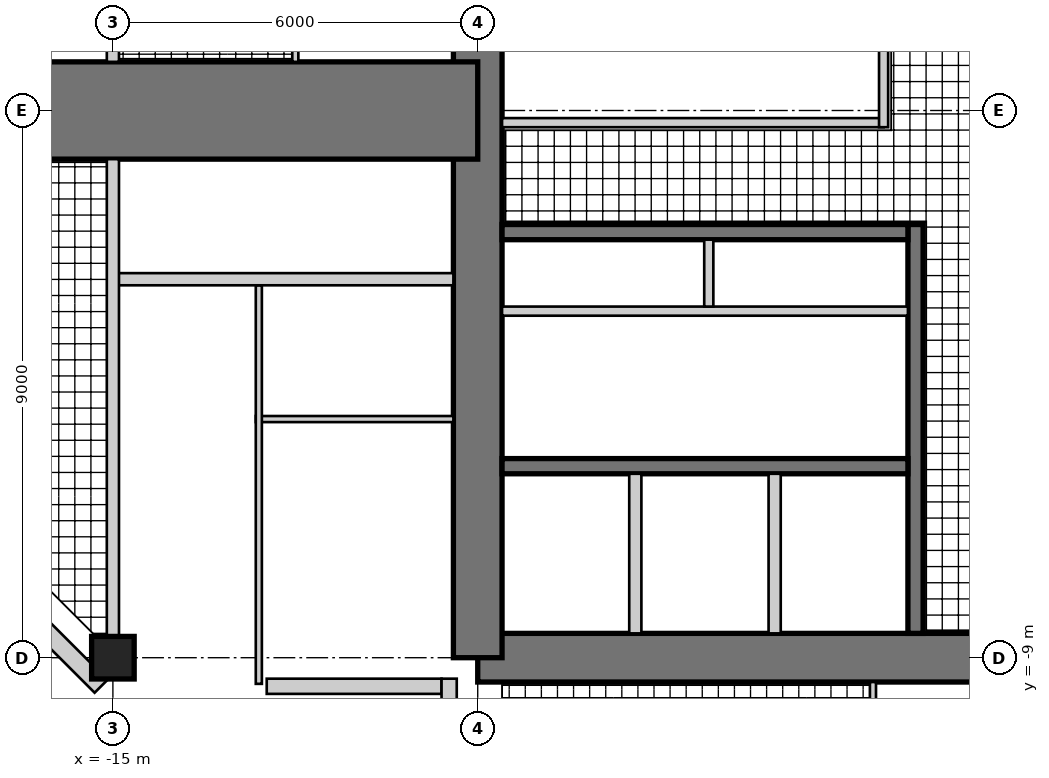
"""IFC4 building model, lengths in metres.
Left out: names, types, materials, properties, quantities, classifications, styles, units other than length and angle.
Written with IfcOpenShell. Run it as: python <this file> out.ifc"""

import sys

from ifc_helpers import new_model, si_unit, direction, frame, frame_2d, origin, origin_2d, place, context, subcontext, project, spatial, rectangle, hollow_rectangle, extrude, element, fill, save


model = new_model("IFC4")
c1 = context("Model", 3, precision=1e-05, world=origin(), true_north=direction((0.0, 1.0)))
c2 = subcontext(c1, "Body", "Model", "MODEL_VIEW")
j1 = project(units=[si_unit("LENGTHUNIT", "METRE"), si_unit("PLANEANGLEUNIT", "RADIAN")], contexts=[c1])
p1 = place(None, origin())
s1 = spatial("IfcSite", under=j1, at=p1, CompositionType="ELEMENT")
p2 = place(p1, origin())
s2 = spatial("IfcBuilding", under=s1, at=p2, CompositionType="ELEMENT")
p3 = place(p2, frame((0.0, 0.0, 261.1)))
s3 = spatial("IfcBuildingStorey", under=s2, at=p3, CompositionType="ELEMENT", Elevation=261.1)
p4 = place(p3, frame((-9.0, -9.0, 0.0), z_axis=(0.0, 0.0, 1.0), x_axis=(1.0, 0.0, 0.0)))
e1 = element("IfcWall", 1, at=p4, inside=s3, PredefinedType="SHEAR", context=c2, shape_type="SweptSolid", body=[
    extrude(rectangle(XDim=18.0, YDim=0.8, at=frame_2d((9.0, 0.0))), origin(), (0.0, 0.0, 1.0), 3.4),
])
p5 = place(p4, frame((9.8, 0.0, 0.0)))
e2 = element("IfcOpeningElement", 2, at=p5, cuts=e1, PredefinedType="OPENING", context=c2, shape_type="SweptSolid", body=[
    extrude(rectangle(XDim=1.0, YDim=2.4, at=frame_2d((0.5, 1.2))), frame((0.0, 0.41, 0.0), z_axis=(0.0, -1.0, 0.0), x_axis=(1.0, 0.0, 0.0)), (0.0, 0.0, 1.0), 0.82),
])
p6 = place(p3, frame((-9.0, 9.0, 0.0), z_axis=(0.0, 0.0, 1.0), x_axis=(0.0, -1.0, 0.0)))
e3 = element("IfcWall", 3, at=p6, inside=s3, PredefinedType="SHEAR", context=c2, shape_type="SweptSolid", body=[
    extrude(rectangle(XDim=18.0, YDim=0.8, at=frame_2d((9.0, 0.0))), origin(), (0.0, 0.0, 1.0), 3.4),
])
p7 = place(p6, frame((9.8, 0.0, 0.0)))
e4 = element("IfcOpeningElement", 4, at=p7, cuts=e3, PredefinedType="OPENING", context=c2, shape_type="SweptSolid", body=[
    extrude(rectangle(XDim=1.0, YDim=2.4, at=frame_2d((0.5, 1.2))), frame((0.0, 0.41, 0.0), z_axis=(0.0, -1.0, 0.0), x_axis=(1.0, 0.0, 0.0)), (0.0, 0.0, 1.0), 0.82),
])
p8 = place(p3, frame((-1.8, -1.875, 0.0), z_axis=(0.0, 0.0, 1.0), x_axis=(0.0, -1.0, 0.0)))
e5 = element("IfcWall", 5, at=p8, inside=s3, PredefinedType="SHEAR", context=c2, shape_type="SweptSolid", body=[
    extrude(rectangle(XDim=6.725, YDim=0.25, at=frame_2d((3.363, 0.0))), origin(), (0.0, 0.0, 1.0), 3.4),
])
p9 = place(p8, frame((1.875, 0.0, 0.0)))
e6 = element("IfcOpeningElement", 6, at=p9, cuts=e5, PredefinedType="OPENING", context=c2, shape_type="SweptSolid", body=[
    extrude(rectangle(XDim=1.6, YDim=2.4, at=frame_2d((0.8, 1.2))), frame((0.0, 0.135, 0.0), z_axis=(0.0, -1.0, 0.0), x_axis=(1.0, 0.0, 0.0)), (0.0, 0.0, 1.0), 0.27),
])
p10 = place(p3, frame((-1.925, -2.0, 0.0), z_axis=(0.0, 0.0, 1.0), x_axis=(-1.0, 0.0, 0.0)))
e7 = element("IfcWall", 7, at=p10, inside=s3, PredefinedType="SHEAR", context=c2, shape_type="SweptSolid", body=[
    extrude(rectangle(XDim=6.675, YDim=0.25, at=frame_2d((3.337, 0.0))), origin(), (0.0, 0.0, 1.0), 3.4),
])
p11 = place(p3, frame((-1.925, -5.85, 0.0), z_axis=(0.0, 0.0, 1.0), x_axis=(-1.0, 0.0, 0.0)))
e8 = element("IfcWall", 8, at=p11, inside=s3, PredefinedType="SHEAR", context=c2, shape_type="SweptSolid", body=[
    extrude(rectangle(XDim=6.675, YDim=0.25, at=frame_2d((3.337, 0.0))), origin(), (0.0, 0.0, 1.0), 3.4),
])
p12 = place(p11, frame((0.496, 0.0, 0.0)))
e9 = element("IfcOpeningElement", 9, at=p12, cuts=e8, PredefinedType="OPENING", context=c2, shape_type="SweptSolid", body=[
    extrude(rectangle(XDim=1.1, YDim=2.2, at=frame_2d((0.55, 1.1))), frame((0.0, 0.135, 0.0), z_axis=(0.0, -1.0, 0.0), x_axis=(1.0, 0.0, 0.0)), (0.0, 0.0, 1.0), 0.27),
])
p13 = place(p11, frame((2.788, 0.0, 0.0)))
e10 = element("IfcOpeningElement", 10, at=p13, cuts=e8, PredefinedType="OPENING", context=c2, shape_type="SweptSolid", body=[
    extrude(rectangle(XDim=1.1, YDim=2.2, at=frame_2d((0.55, 1.1))), frame((0.0, 0.135, 0.0), z_axis=(0.0, -1.0, 0.0), x_axis=(1.0, 0.0, 0.0)), (0.0, 0.0, 1.0), 0.27),
])
p14 = place(p11, frame((5.079, 0.0, 0.0)))
e11 = element("IfcOpeningElement", 11, at=p14, cuts=e8, PredefinedType="OPENING", context=c2, shape_type="SweptSolid", body=[
    extrude(rectangle(XDim=1.1, YDim=2.2, at=frame_2d((0.55, 1.1))), frame((0.0, 0.135, 0.0), z_axis=(0.0, -1.0, 0.0), x_axis=(1.0, 0.0, 0.0)), (0.0, 0.0, 1.0), 0.27),
])
p15 = place(p3, frame((-1.925, -3.3, 0.0), z_axis=(0.0, 0.0, 1.0), x_axis=(-1.0, 0.0, 0.0)))
e12 = element("IfcWall", 12, at=p15, inside=s3, PredefinedType="PARTITIONING", context=c2, shape_type="SweptSolid", body=[
    extrude(rectangle(XDim=6.675, YDim=0.15, at=frame_2d((3.337, 0.0))), origin(), (0.0, 0.0, 1.0), 3.4),
])
p16 = place(p15, frame((0.075, 0.0, 0.0)))
e13 = element("IfcOpeningElement", 13, at=p16, cuts=e12, PredefinedType="OPENING", context=c2, shape_type="SweptSolid", body=[
    extrude(rectangle(XDim=0.8, YDim=2.1, at=frame_2d((0.4, 1.05))), frame((0.0, 0.085, 0.0), z_axis=(0.0, -1.0, 0.0), x_axis=(1.0, 0.0, 0.0)), (0.0, 0.0, 1.0), 0.17),
])
p17 = place(p15, frame((3.675, 0.0, 0.0)))
e14 = element("IfcOpeningElement", 14, at=p17, cuts=e12, PredefinedType="OPENING", context=c2, shape_type="SweptSolid", body=[
    extrude(rectangle(XDim=0.8, YDim=2.1, at=frame_2d((0.4, 1.05))), frame((0.0, 0.085, 0.0), z_axis=(0.0, -1.0, 0.0), x_axis=(1.0, 0.0, 0.0)), (0.0, 0.0, 1.0), 0.17),
])
p18 = place(p3, frame((-5.2, -2.125, 0.0), z_axis=(0.0, 0.0, 1.0), x_axis=(0.0, -1.0, 0.0)))
e15 = element("IfcWall", 15, at=p18, inside=s3, PredefinedType="PARTITIONING", context=c2, shape_type="SweptSolid", body=[
    extrude(rectangle(XDim=1.1, YDim=0.15, at=frame_2d((0.55, 0.0))), origin(), (0.0, 0.0, 1.0), 3.4),
])
for number, where, z_axis, x_axis in (
    (16, (-4.117, -5.975, 0.0), (0.0, 0.0, 1.0), (0.0, -1.0, 0.0)),
    (17, (-6.408, -5.975, 0.0), (0.0, 0.0, 1.0), (0.0, -1.0, 0.0)),
):
    element("IfcWall", number, at=place(p3, frame(where, z_axis=z_axis, x_axis=x_axis)), inside=s3, PredefinedType="PARTITIONING", context=c2, shape_type="SweptSolid", body=[
        extrude(rectangle(XDim=2.625, YDim=0.2, at=frame_2d((1.312, 0.0))), origin(), (0.0, 0.0, 1.0), 3.4),
    ])
p19 = place(p3, frame((-9.0, 0.0, 0.0), z_axis=(0.0, 0.0, 1.0), x_axis=(-1.0, 0.0, 0.0)))
e18 = element("IfcWall", 18, at=p19, inside=s3, PredefinedType="SHEAR", context=c2, shape_type="SweptSolid", body=[
    extrude(rectangle(XDim=9.0, YDim=1.6, at=frame_2d((4.5, 0.0))), origin(), (0.0, 0.0, 1.0), 3.4),
])
p20 = place(p19, frame((3.8, 0.0, 0.0)))
e19 = element("IfcOpeningElement", 19, at=p20, cuts=e18, PredefinedType="OPENING", context=c2, shape_type="SweptSolid", body=[
    extrude(rectangle(XDim=1.0, YDim=2.15, at=frame_2d((0.5, 1.075))), frame((0.0, 0.81, 0.0), z_axis=(0.0, -1.0, 0.0), x_axis=(1.0, 0.0, 0.0)), (0.0, 0.0, 1.0), 1.62),
])
p21 = place(p19, frame((7.0, 0.0, 0.0)))
e20 = element("IfcOpeningElement", 20, at=p21, cuts=e18, PredefinedType="OPENING", context=c2, shape_type="SweptSolid", body=[
    extrude(rectangle(XDim=1.0, YDim=2.2, at=frame_2d((0.5, 1.1))), frame((0.0, 0.81, 0.0), z_axis=(0.0, -1.0, 0.0), x_axis=(1.0, 0.0, 0.0)), (0.0, 0.0, 1.0), 1.62),
])
p22 = place(p3, frame((-15.0, -9.0, 0.0), z_axis=(0.0, 0.0, 1.0), x_axis=(1.0, 0.0, 0.0)))
e21 = element("IfcColumn", 21, at=p22, inside=s3, PredefinedType="COLUMN", context=c2, shape_type="SweptSolid", body=[
    extrude(rectangle(XDim=0.7, YDim=0.7, at=origin_2d()), origin(), (0.0, 0.0, 1.0), 3.4),
])
p23 = place(p3, frame((-18.47, -6.195, 0.0), z_axis=(0.0, 0.0, 1.0), x_axis=(0.707106781187, -0.707106781187, 0.0)))
e22 = element("IfcWall", 22, at=p23, inside=s3, PredefinedType="SOLIDWALL", context=c2, shape_type="SweptSolid", body=[
    extrude(rectangle(XDim=4.632, YDim=0.3, at=frame_2d((2.316, 0.0))), origin(), (0.0, 0.0, 1.0), 3.22),
])
p24 = place(p23, frame((1.866, 0.0, 0.3)))
e23 = element("IfcOpeningElement", 23, at=p24, cuts=e22, PredefinedType="OPENING", context=c2, shape_type="SweptSolid", body=[
    extrude(rectangle(XDim=0.9, YDim=2.4, at=frame_2d((0.45, 1.2))), frame((0.0, 0.16, 0.0), z_axis=(0.0, -1.0, 0.0), x_axis=(1.0, 0.0, 0.0)), (0.0, 0.0, 1.0), 0.32),
])
p25 = place(p3, frame((-12.47, -9.47, 0.0), z_axis=(0.0, 0.0, 1.0), x_axis=(1.0, 0.0, 0.0)))
e24 = element("IfcWall", 24, at=p25, inside=s3, PredefinedType="SOLIDWALL", context=c2, shape_type="SweptSolid", body=[
    extrude(rectangle(XDim=2.875, YDim=0.25, at=frame_2d((1.438, 0.0))), origin(), (0.0, 0.0, 1.0), 3.22),
])
p26 = place(p25, frame((0.6, 0.0, 0.0)))
e25 = element("IfcOpeningElement", 25, at=p26, cuts=e24, PredefinedType="OPENING", context=c2, shape_type="SweptSolid", body=[
    extrude(rectangle(XDim=1.0, YDim=2.2, at=frame_2d((0.5, 1.1))), frame((0.0, 0.135, 0.0), z_axis=(0.0, -1.0, 0.0), x_axis=(1.0, 0.0, 0.0)), (0.0, 0.0, 1.0), 0.27),
])
p27 = place(p3, frame((-9.47, -9.345, 0.0), z_axis=(0.0, 0.0, 1.0), x_axis=(0.0, -1.0, 0.0)))
e26 = element("IfcWall", 26, at=p27, inside=s3, PredefinedType="SOLIDWALL", context=c2, shape_type="SweptSolid", body=[
    extrude(rectangle(XDim=3.125, YDim=0.25, at=frame_2d((1.562, 0.0))), origin(), (0.0, 0.0, 1.0), 3.22),
])
p28 = place(p27, frame((0.6, 0.0, 0.0)))
e27 = element("IfcOpeningElement", 27, at=p28, cuts=e26, PredefinedType="OPENING", context=c2, shape_type="SweptSolid", body=[
    extrude(rectangle(XDim=1.0, YDim=2.2, at=frame_2d((0.5, 1.1))), frame((0.0, 0.135, 0.0), z_axis=(0.0, -1.0, 0.0), x_axis=(1.0, 0.0, 0.0)), (0.0, 0.0, 1.0), 0.27),
])
p29 = place(p3, frame((-2.325, -0.2, 0.0), z_axis=(0.0, 0.0, 1.0), x_axis=(-1.0, 0.0, 0.0)))
e28 = element("IfcWall", 28, at=p29, inside=s3, PredefinedType="PARTITIONING", context=c2, shape_type="SweptSolid", body=[
    extrude(rectangle(XDim=6.275, YDim=0.15, at=frame_2d((3.138, 0.0))), origin(), (0.0, 0.0, 1.0), 3.22),
])
p30 = place(p29, frame((0.4, 0.0, 0.0)))
e29 = element("IfcOpeningElement", 29, at=p30, cuts=e28, PredefinedType="OPENING", context=c2, shape_type="SweptSolid", body=[
    extrude(rectangle(XDim=1.0, YDim=2.1, at=frame_2d((0.5, 1.05))), frame((0.0, 0.085, 0.0), z_axis=(0.0, -1.0, 0.0), x_axis=(1.0, 0.0, 0.0)), (0.0, 0.0, 1.0), 0.17),
])
p31 = place(p3, frame((-2.325, 1.675, 0.0), z_axis=(0.0, 0.0, 1.0), x_axis=(0.0, -1.0, 0.0)))
e30 = element("IfcWall", 30, at=p31, inside=s3, PredefinedType="PARTITIONING", context=c2, shape_type="SweptSolid", body=[
    extrude(rectangle(XDim=1.95, YDim=0.15, at=frame_2d((0.975, 0.0))), origin(), (0.0, 0.0, 1.0), 3.22),
])
p32 = place(p3, frame((-2.5, -9.4, 0.0), z_axis=(0.0, 0.0, 1.0), x_axis=(0.0, -1.0, 0.0)))
e31 = element("IfcWall", 31, at=p32, inside=s3, PredefinedType="PARTITIONING", context=c2, shape_type="SweptSolid", body=[
    extrude(rectangle(XDim=2.65, YDim=0.1, at=frame_2d((1.325, 0.0))), origin(), (0.0, 0.0, 1.0), 3.22),
])
p33 = place(p3, frame((-9.4, -5.075, 0.0), z_axis=(0.0, 0.0, 1.0), x_axis=(-1.0, 0.0, 0.0)))
e32 = element("IfcWall", 32, at=p33, inside=s3, PredefinedType="PARTITIONING", context=c2, shape_type="SweptSolid", body=[
    extrude(rectangle(XDim=3.25, YDim=0.1, at=frame_2d((1.625, 0.0))), origin(), (0.0, 0.0, 1.0), 3.22),
])
p34 = place(p3, frame((-12.6, -2.875, 0.0), z_axis=(0.0, 0.0, 1.0), x_axis=(0.0, -1.0, 0.0)))
e33 = element("IfcWall", 33, at=p34, inside=s3, PredefinedType="PARTITIONING", context=c2, shape_type="SweptSolid", body=[
    extrude(rectangle(XDim=6.555, YDim=0.1, at=frame_2d((3.277, 0.0))), origin(), (0.0, 0.0, 1.0), 3.22),
])
p35 = place(p34, frame((0.55, 0.0, 0.0)))
e34 = element("IfcOpeningElement", 34, at=p35, cuts=e33, PredefinedType="OPENING", context=c2, shape_type="SweptSolid", body=[
    extrude(rectangle(XDim=0.9, YDim=2.1, at=frame_2d((0.45, 1.05))), frame((0.0, 0.06, 0.0), z_axis=(0.0, -1.0, 0.0), x_axis=(1.0, 0.0, 0.0)), (0.0, 0.0, 1.0), 0.12),
])
p36 = place(p34, frame((2.65, 0.0, 0.0)))
e35 = element("IfcOpeningElement", 35, at=p36, cuts=e33, PredefinedType="OPENING", context=c2, shape_type="SweptSolid", body=[
    extrude(rectangle(XDim=0.9, YDim=2.1, at=frame_2d((0.45, 1.05))), frame((0.0, 0.06, 0.0), z_axis=(0.0, -1.0, 0.0), x_axis=(1.0, 0.0, 0.0)), (0.0, 0.0, 1.0), 0.12),
])
p37 = place(p3, frame((-12.0, 9.345, 0.0), z_axis=(0.0, 0.0, 1.0), x_axis=(0.0, -1.0, 0.0)))
e36 = element("IfcWall", 36, at=p37, inside=s3, PredefinedType="PARTITIONING", context=c2, shape_type="SweptSolid", body=[
    extrude(rectangle(XDim=8.545, YDim=0.1, at=frame_2d((4.272, 0.0))), origin(), (0.0, 0.0, 1.0), 3.22),
])
p38 = place(p37, frame((4.995, 0.0, 0.0)))
e37 = element("IfcOpeningElement", 37, at=p38, cuts=e36, PredefinedType="OPENING", context=c2, shape_type="SweptSolid", body=[
    extrude(rectangle(XDim=0.9, YDim=2.1, at=frame_2d((0.45, 1.05))), frame((0.0, 0.06, 0.0), z_axis=(0.0, -1.0, 0.0), x_axis=(1.0, 0.0, 0.0)), (0.0, 0.0, 1.0), 0.12),
])
p39 = place(p37, frame((7.095, 0.0, 0.0)))
e38 = element("IfcOpeningElement", 38, at=p39, cuts=e36, PredefinedType="OPENING", context=c2, shape_type="SweptSolid", body=[
    extrude(rectangle(XDim=0.9, YDim=2.1, at=frame_2d((0.45, 1.05))), frame((0.0, 0.06, 0.0), z_axis=(0.0, -1.0, 0.0), x_axis=(1.0, 0.0, 0.0)), (0.0, 0.0, 1.0), 0.12),
])
p40 = place(p3, frame((-9.4, -2.775, 0.0), z_axis=(0.0, 0.0, 1.0), x_axis=(-1.0, 0.0, 0.0)))
e39 = element("IfcWall", 39, at=p40, inside=s3, PredefinedType="SOLIDWALL", context=c2, shape_type="SweptSolid", body=[
    extrude(rectangle(XDim=5.6, YDim=0.2, at=frame_2d((2.8, 0.0))), origin(), (0.0, 0.0, 1.0), 3.22),
])
p41 = place(p40, frame((3.75, 0.0, 0.0)))
e40 = element("IfcOpeningElement", 40, at=p41, cuts=e39, PredefinedType="OPENING", context=c2, shape_type="SweptSolid", body=[
    extrude(rectangle(XDim=1.0, YDim=2.15, at=frame_2d((0.5, 1.075))), frame((0.0, 0.11, 0.0), z_axis=(0.0, -1.0, 0.0), x_axis=(1.0, 0.0, 0.0)), (0.0, 0.0, 1.0), 0.22),
])
p42 = place(p3, frame((-15.0, 8.65, 0.0), z_axis=(0.0, 0.0, 1.0), x_axis=(0.0, -1.0, 0.0)))
e41 = element("IfcWall", 41, at=p42, inside=s3, PredefinedType="SOLIDWALL", context=c2, shape_type="SweptSolid", body=[
    extrude(rectangle(XDim=7.85, YDim=0.2, at=frame_2d((3.925, 0.0))), origin(), (0.0, 0.0, 1.0), 2.52),
])
p43 = place(p3, frame((-15.0, -0.8, 0.0), z_axis=(0.0, 0.0, 1.0), x_axis=(0.0, -1.0, 0.0)))
e42 = element("IfcWall", 42, at=p43, inside=s3, PredefinedType="SOLIDWALL", context=c2, shape_type="SweptSolid", body=[
    extrude(rectangle(XDim=7.85, YDim=0.2, at=frame_2d((3.925, 0.0))), origin(), (0.0, 0.0, 1.0), 2.52),
])
p44 = place(p43, frame((0.35, 0.0, 0.0)))
e43 = element("IfcOpeningElement", 43, at=p44, cuts=e42, PredefinedType="OPENING", context=c2, shape_type="SweptSolid", body=[
    extrude(rectangle(XDim=1.0, YDim=2.2, at=frame_2d((0.5, 1.1))), frame((0.0, 0.11, 0.0), z_axis=(0.0, -1.0, 0.0), x_axis=(1.0, 0.0, 0.0)), (0.0, 0.0, 1.0), 0.22),
])
p45 = place(p26, origin())
e44 = element("IfcDoor", 44, at=p45, inside=s3, OperationType="SINGLE_SWING_LEFT", PredefinedType="DOOR", context=c2, shape_type="SweptSolid", body=[
    extrude(hollow_rectangle(XDim=1.0, YDim=2.2, WallThickness=0.06, at=frame_2d((0.5, 1.1))), frame((0.0, 0.025, 0.0), z_axis=(0.0, -1.0, 0.0), x_axis=(1.0, 0.0, 0.0)), (0.0, 0.0, 1.0), 0.05),
    extrude(rectangle(XDim=0.879, YDim=2.079, at=frame_2d((0.5, 1.1))), frame((0.0, 0.025, 0.0), z_axis=(0.0, -1.0, 0.0), x_axis=(1.0, 0.0, 0.0)), (0.0, 0.0, 1.0), 0.05),
])
fill(e25, e44)
p46 = place(p30, frame((1.0, 0.0, 0.0), z_axis=(0.0, 0.0, 1.0), x_axis=(-1.0, 0.0, 0.0)))
e45 = element("IfcDoor", 45, at=p46, inside=s3, OperationType="SINGLE_SWING_RIGHT", PredefinedType="DOOR", context=c2, shape_type="SweptSolid", body=[
    extrude(rectangle(XDim=1.0, YDim=2.1, at=frame_2d((0.5, 1.05))), frame((0.0, 0.025, 0.0), z_axis=(0.0, -1.0, 0.0), x_axis=(1.0, 0.0, 0.0)), (0.0, 0.0, 1.0), 0.05),
])
fill(e29, e45)
p47 = place(p35, origin())
e46 = element("IfcDoor", 46, at=p47, inside=s3, OperationType="SINGLE_SWING_LEFT", PredefinedType="DOOR", context=c2, shape_type="SweptSolid", body=[
    extrude(rectangle(XDim=0.9, YDim=2.1, at=frame_2d((0.45, 1.05))), frame((0.0, 0.025, 0.0), z_axis=(0.0, -1.0, 0.0), x_axis=(1.0, 0.0, 0.0)), (0.0, 0.0, 1.0), 0.05),
])
fill(e34, e46)
p48 = place(p36, origin())
e47 = element("IfcDoor", 47, at=p48, inside=s3, OperationType="SINGLE_SWING_LEFT", PredefinedType="DOOR", context=c2, shape_type="SweptSolid", body=[
    extrude(rectangle(XDim=0.9, YDim=2.1, at=frame_2d((0.45, 1.05))), frame((0.0, 0.025, 0.0), z_axis=(0.0, -1.0, 0.0), x_axis=(1.0, 0.0, 0.0)), (0.0, 0.0, 1.0), 0.05),
])
fill(e35, e47)
p49 = place(p41, origin())
e48 = element("IfcDoor", 48, at=p49, inside=s3, OperationType="SINGLE_SWING_LEFT", PredefinedType="DOOR", context=c2, shape_type="SweptSolid", body=[
    extrude(rectangle(XDim=1.0, YDim=2.15, at=frame_2d((0.5, 1.075))), frame((0.0, 0.025, 0.0), z_axis=(0.0, -1.0, 0.0), x_axis=(1.0, 0.0, 0.0)), (0.0, 0.0, 1.0), 0.05),
])
fill(e40, e48)
p50 = place(p44, frame((1.0, 0.0, 0.0), z_axis=(0.0, 0.0, 1.0), x_axis=(-1.0, 0.0, 0.0)))
e49 = element("IfcDoor", 49, at=p50, inside=s3, OperationType="SINGLE_SWING_RIGHT", PredefinedType="DOOR", context=c2, shape_type="SweptSolid", body=[
    extrude(rectangle(XDim=1.0, YDim=2.2, at=frame_2d((0.5, 1.1))), frame((0.0, 0.025, 0.0), z_axis=(0.0, -1.0, 0.0), x_axis=(1.0, 0.0, 0.0)), (0.0, 0.0, 1.0), 0.05),
])
fill(e43, e49)
p51 = place(p20, frame((1.0, 0.0, 0.0), z_axis=(0.0, 0.0, 1.0), x_axis=(-1.0, 0.0, 0.0)))
e50 = element("IfcDoor", 50, at=p51, inside=s3, OperationType="SINGLE_SWING_RIGHT", PredefinedType="DOOR", context=c2, shape_type="SweptSolid", body=[
    extrude(rectangle(XDim=1.0, YDim=2.15, at=frame_2d((0.5, 1.075))), frame((0.0, 0.025, 0.0), z_axis=(0.0, -1.0, 0.0), x_axis=(1.0, 0.0, 0.0)), (0.0, 0.0, 1.0), 0.05),
])
fill(e19, e50)
p52 = place(p7, origin())
e51 = element("IfcDoor", 51, at=p52, inside=s3, OperationType="SINGLE_SWING_RIGHT", PredefinedType="DOOR", context=c2, shape_type="SweptSolid", body=[
    extrude(rectangle(XDim=1.0, YDim=2.4, at=frame_2d((0.5, 1.2))), frame((0.0, 0.055, 0.0), z_axis=(0.0, -1.0, 0.0), x_axis=(1.0, 0.0, 0.0)), (0.0, 0.0, 1.0), 0.05),
])
fill(e4, e51)
p53 = place(p12, origin())
e52 = element("IfcDoor", 52, at=p53, inside=s3, OperationType="DOUBLE_DOOR_SLIDING", PredefinedType="DOOR", context=c2, shape_type="SweptSolid", body=[
    extrude(rectangle(XDim=1.1, YDim=2.2, at=frame_2d((0.55, 1.1))), frame((0.0, 0.025, 0.0), z_axis=(0.0, -1.0, 0.0), x_axis=(1.0, 0.0, 0.0)), (0.0, 0.0, 1.0), 0.05),
])
fill(e9, e52)
p54 = place(p13, origin())
e53 = element("IfcDoor", 53, at=p54, inside=s3, OperationType="DOUBLE_DOOR_SLIDING", PredefinedType="DOOR", context=c2, shape_type="SweptSolid", body=[
    extrude(rectangle(XDim=1.1, YDim=2.2, at=frame_2d((0.55, 1.1))), frame((0.0, 0.025, 0.0), z_axis=(0.0, -1.0, 0.0), x_axis=(1.0, 0.0, 0.0)), (0.0, 0.0, 1.0), 0.05),
])
fill(e10, e53)
p55 = place(p14, origin())
e54 = element("IfcDoor", 54, at=p55, inside=s3, OperationType="DOUBLE_DOOR_SLIDING", PredefinedType="DOOR", context=c2, shape_type="SweptSolid", body=[
    extrude(rectangle(XDim=1.1, YDim=2.2, at=frame_2d((0.55, 1.1))), frame((0.0, 0.025, 0.0), z_axis=(0.0, -1.0, 0.0), x_axis=(1.0, 0.0, 0.0)), (0.0, 0.0, 1.0), 0.05),
])
fill(e11, e54)
p56 = place(p9, origin())
e55 = element("IfcDoor", 55, at=p56, inside=s3, OperationType="DOUBLE_DOOR_DOUBLE_SWING", PredefinedType="DOOR", context=c2, shape_type="SweptSolid", body=[
    extrude(rectangle(XDim=1.6, YDim=2.4, at=frame_2d((0.8, 1.2))), frame((0.0, 0.025, 0.0), z_axis=(0.0, -1.0, 0.0), x_axis=(1.0, 0.0, 0.0)), (0.0, 0.0, 1.0), 0.05),
])
fill(e6, e55)
p57 = place(p16, frame((0.8, 0.0, 0.0), z_axis=(0.0, 0.0, 1.0), x_axis=(-1.0, 0.0, 0.0)))
e56 = element("IfcDoor", 56, at=p57, inside=s3, OperationType="SINGLE_SWING_RIGHT", PredefinedType="DOOR", context=c2, shape_type="SweptSolid", body=[
    extrude(rectangle(XDim=0.8, YDim=2.1, at=frame_2d((0.4, 1.05))), frame((0.0, 0.025, 0.0), z_axis=(0.0, -1.0, 0.0), x_axis=(1.0, 0.0, 0.0)), (0.0, 0.0, 1.0), 0.05),
])
fill(e13, e56)
p58 = place(p17, frame((0.8, 0.0, 0.0), z_axis=(0.0, 0.0, 1.0), x_axis=(-1.0, 0.0, 0.0)))
e57 = element("IfcDoor", 57, at=p58, inside=s3, OperationType="SINGLE_SWING_RIGHT", PredefinedType="DOOR", context=c2, shape_type="SweptSolid", body=[
    extrude(rectangle(XDim=0.8, YDim=2.1, at=frame_2d((0.4, 1.05))), frame((0.0, 0.025, 0.0), z_axis=(0.0, -1.0, 0.0), x_axis=(1.0, 0.0, 0.0)), (0.0, 0.0, 1.0), 0.05),
])
fill(e14, e57)
save(model, sys.argv[1])
